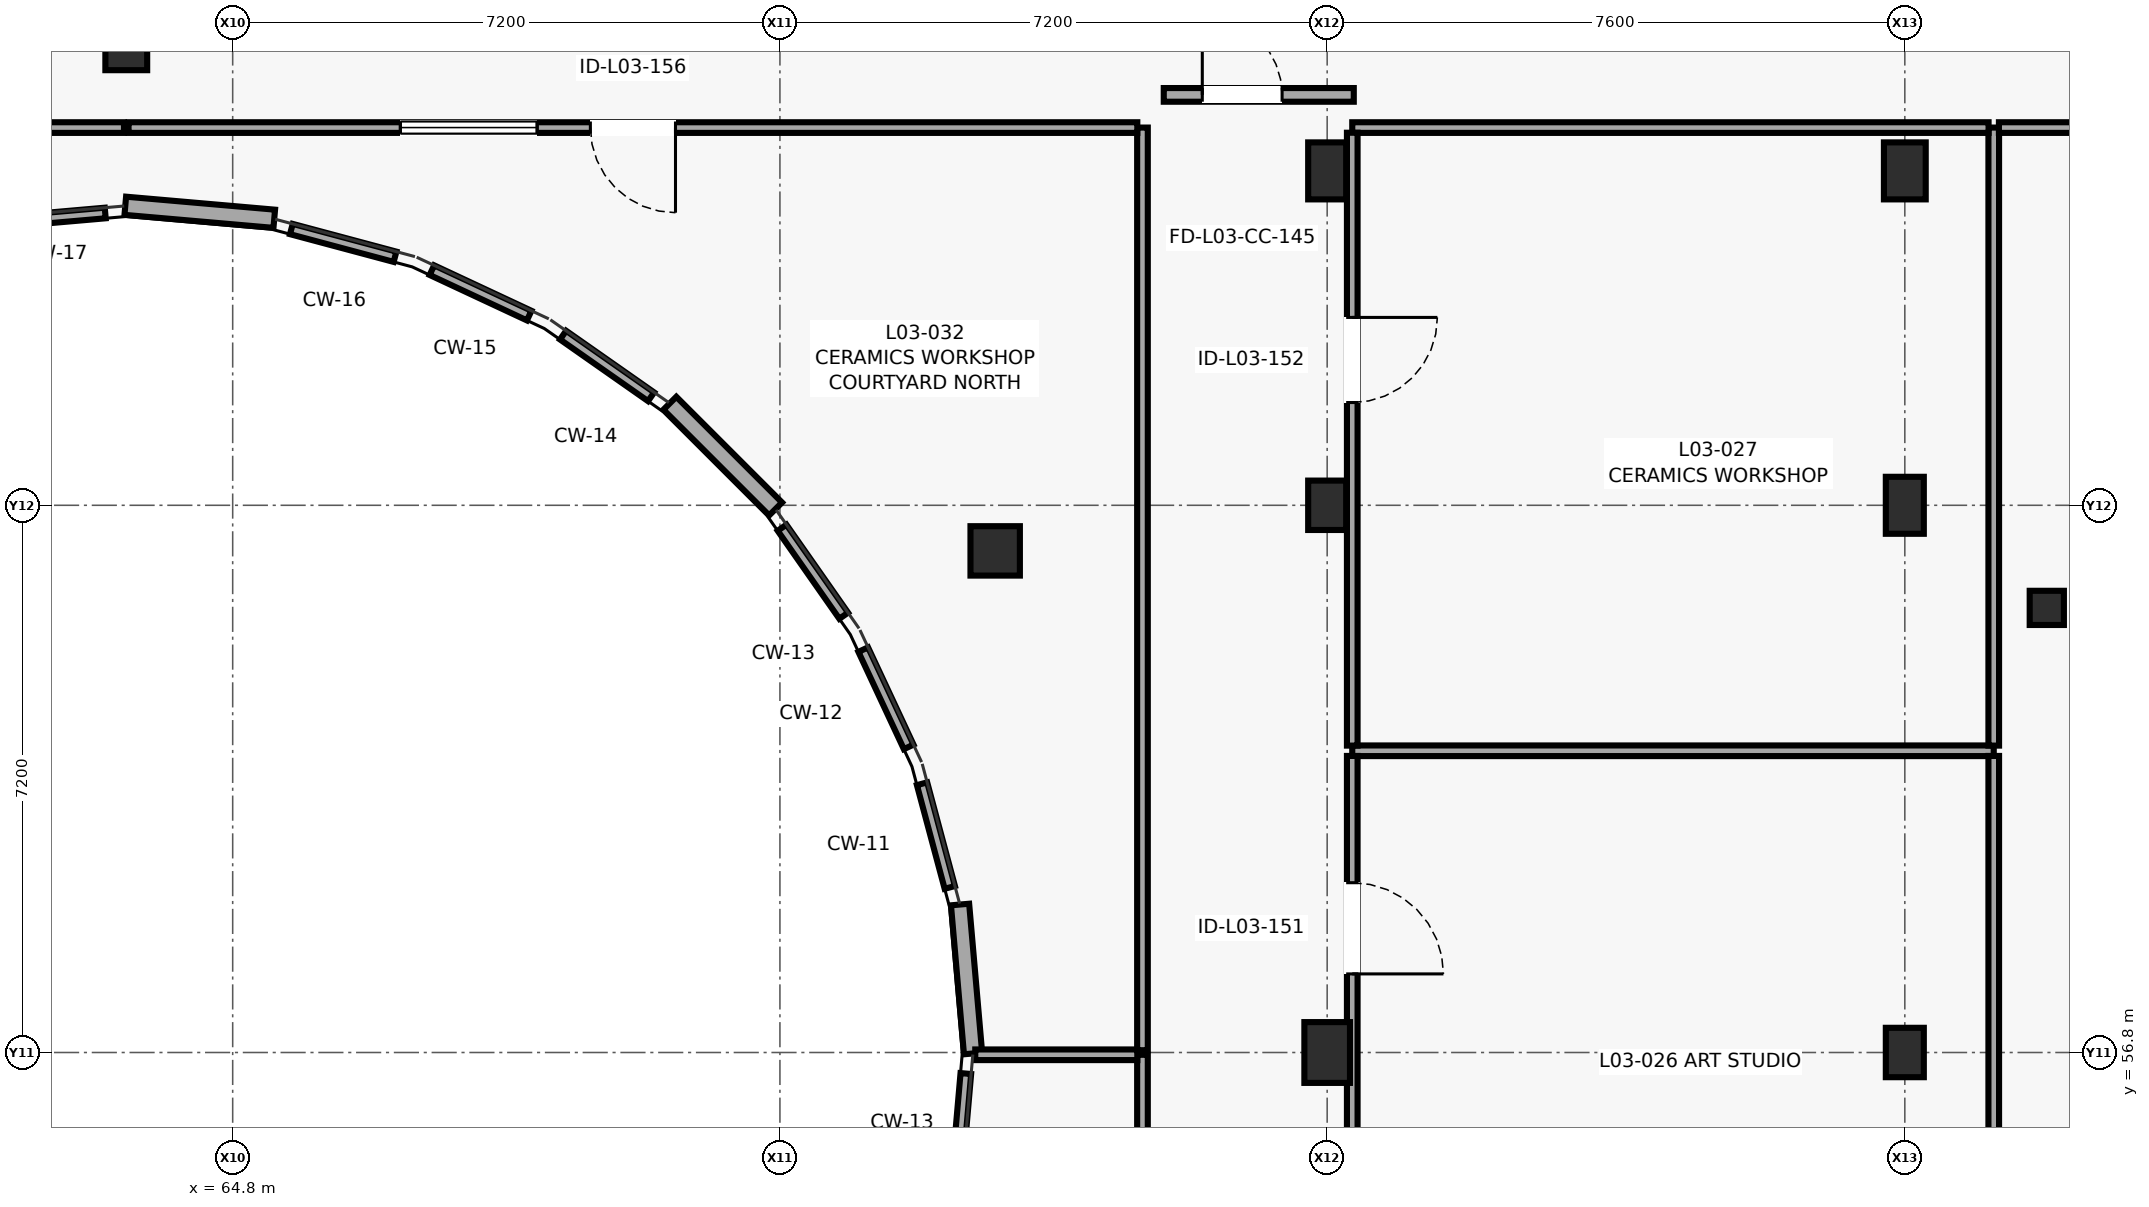
"""IFC4 building model, lengths in metres.
Left out: names, types, materials, properties, quantities, classifications, styles, units other than length and angle.
Written with IfcOpenShell. Run it as: python <this file> out.ifc"""

import sys

from ifc_helpers import new_model, si_unit, direction, frame, frame_2d, origin, origin_2d, place, context, subcontext, project, spatial, rectangle, circle, extrude, element, fill, save


model = new_model("IFC4")
c1 = context("Model", 3, precision=1e-05, world=origin(), true_north=direction((0.0, 1.0)))
c2 = subcontext(c1, "Body", "Model", "MODEL_VIEW")
j1 = project(units=[si_unit("LENGTHUNIT", "METRE"), si_unit("PLANEANGLEUNIT", "RADIAN")], contexts=[c1])
p1 = place(None, origin())
s1 = spatial("IfcSite", under=j1, at=p1, CompositionType="ELEMENT")
p2 = place(p1, origin())
s2 = spatial("IfcBuilding", under=s1, at=p2, CompositionType="ELEMENT")
p3 = place(p2, frame((0.0, 0.0, 12.2)))
s3 = spatial("IfcBuildingStorey", under=s2, at=p3, CompositionType="ELEMENT", Elevation=12.2)
p4 = place(p3, frame((63.4, 70.0, 0.0), z_axis=(0.0, 0.0, 1.0), x_axis=(1.0, 0.0, 0.0)))
e1 = element("IfcColumn", 1, at=p4, inside=s3, PredefinedType="COLUMN", context=c2, shape_type="SweptSolid", body=[
    extrude(circle(Radius=0.275, at=origin_2d()), origin(), (0.0, 0.0, 1.0), 4.0),
])
p5 = place(p3, frame((74.832, 63.4, 0.0), z_axis=(0.0, 0.0, 1.0), x_axis=(1.0, 0.0, 0.0)))
e2 = element("IfcColumn", 2, at=p5, inside=s3, PredefinedType="COLUMN", context=c2, shape_type="SweptSolid", body=[
    extrude(circle(Radius=0.325, at=origin_2d()), origin(), (0.0, 0.0, 1.0), 4.0),
])
p6 = place(p3, frame((79.2, 56.8, 0.0), z_axis=(0.0, 0.0, 1.0), x_axis=(1.0, 0.0, 0.0)))
e3 = element("IfcColumn", 3, at=p6, inside=s3, PredefinedType="COLUMN", context=c2, shape_type="SweptSolid", body=[
    extrude(rectangle(XDim=0.6, YDim=0.8, at=origin_2d()), origin(), (0.0, 0.0, 1.0), 4.0),
])
p7 = place(p3, frame((79.2, 64.0, 0.0), z_axis=(0.0, 0.0, 1.0), x_axis=(1.0, 0.0, 0.0)))
e4 = element("IfcColumn", 4, at=p7, inside=s3, PredefinedType="COLUMN", context=c2, shape_type="SweptSolid", body=[
    extrude(rectangle(XDim=0.5, YDim=0.65, at=origin_2d()), origin(), (0.0, 0.0, 1.0), 4.0),
])
p8 = place(p3, frame((79.2, 68.4, 0.0), z_axis=(0.0, 0.0, 1.0), x_axis=(1.0, 0.0, 0.0)))
e5 = element("IfcColumn", 5, at=p8, inside=s3, PredefinedType="COLUMN", context=c2, shape_type="SweptSolid", body=[
    extrude(rectangle(XDim=0.5, YDim=0.75, at=origin_2d()), origin(), (0.0, 0.0, 1.0), 4.0),
])
p9 = place(p3, frame((86.8, 56.8, 0.0), z_axis=(0.0, 0.0, 1.0), x_axis=(1.0, 0.0, 0.0)))
e6 = element("IfcColumn", 6, at=p9, inside=s3, PredefinedType="COLUMN", context=c2, shape_type="SweptSolid", body=[
    extrude(rectangle(XDim=0.5, YDim=0.65, at=origin_2d()), origin(), (0.0, 0.0, 1.0), 4.0),
])
p10 = place(p3, frame((86.8, 64.0, 0.0), z_axis=(0.0, 0.0, 1.0), x_axis=(1.0, 0.0, 0.0)))
e7 = element("IfcColumn", 7, at=p10, inside=s3, PredefinedType="COLUMN", context=c2, shape_type="SweptSolid", body=[
    extrude(rectangle(XDim=0.5, YDim=0.75, at=origin_2d()), origin(), (0.0, 0.0, 1.0), 4.0),
])
p11 = place(p3, frame((86.8, 68.4, 0.0), z_axis=(0.0, 0.0, 1.0), x_axis=(1.0, 0.0, 0.0)))
e8 = element("IfcColumn", 8, at=p11, inside=s3, PredefinedType="COLUMN", context=c2, shape_type="SweptSolid", body=[
    extrude(rectangle(XDim=0.55, YDim=0.75, at=origin_2d()), origin(), (0.0, 0.0, 1.0), 4.0),
])
p12 = place(p3, frame((88.668, 62.65, 0.0), z_axis=(0.0, 0.0, 1.0), x_axis=(1.0, 0.0, 0.0)))
e9 = element("IfcColumn", 9, at=p12, inside=s3, PredefinedType="COLUMN", context=c2, shape_type="SweptSolid", body=[
    extrude(circle(Radius=0.225, at=origin_2d()), origin(), (0.0, 0.0, 1.0), 4.0),
])
for number, where, z_axis, x_axis in (
    (10, (71.943, 63.952, 0.0), (0.0, 0.0, 1.0), (-0.707, 0.707, 0.0)),
    (11, (65.347, 67.77, 0.0), (0.0, 0.0, 1.0), (-0.996, 0.087, 0.0)),
    (12, (74.541, 56.787, 0.0), (0.0, 0.0, 1.0), (-0.087, 0.996, 0.0)),
):
    element("IfcWall", number, at=place(p3, frame(where, z_axis=z_axis, x_axis=x_axis)), inside=s3, PredefinedType="SOLIDWALL", context=c2, shape_type="SweptSolid", body=[
        extrude(rectangle(XDim=1.967, YDim=0.24, at=frame_2d((0.984, 0.0))), origin(), (0.0, 0.0, 1.0), 3.78),
    ])
p13 = place(p3, frame((77.05, 69.4, 0.0), z_axis=(0.0, 0.0, 1.0), x_axis=(1.0, 0.0, 0.0)))
e13 = element("IfcWall", 13, at=p13, inside=s3, PredefinedType="PARTITIONING", context=c2, shape_type="SweptSolid", body=[
    extrude(rectangle(XDim=2.5, YDim=0.18, at=frame_2d((1.25, 0.0))), origin(), (0.0, 0.0, 1.0), 3.78),
])
p14 = place(p13, frame((0.507, 0.0, 0.0)))
e14 = element("IfcOpeningElement", 14, at=p14, cuts=e13, PredefinedType="OPENING", context=c2, shape_type="SweptSolid", body=[
    extrude(rectangle(XDim=1.05, YDim=2.15, at=frame_2d((0.525, 1.075))), frame((0.0, 0.1, 0.0), z_axis=(0.0, -1.0, 0.0), x_axis=(1.0, 0.0, 0.0)), (0.0, 0.0, 1.0), 0.2),
])
p15 = place(p3, frame((87.97, 60.77, 0.0), z_axis=(0.0, 0.0, 1.0), x_axis=(-1.0, 0.0, 0.0)))
e15 = element("IfcWall", 15, at=p15, inside=s3, PredefinedType="PARTITIONING", context=c2, shape_type="SweptSolid", body=[
    extrude(rectangle(XDim=8.44, YDim=0.14, at=frame_2d((4.22, 0.0))), origin(), (0.0, 0.0, 1.0), 3.755),
])
p16 = place(p3, frame((79.53, 60.702, 0.0), z_axis=(0.0, 0.0, 1.0), x_axis=(0.0, -1.0, 0.0)))
e16 = element("IfcWall", 16, at=p16, inside=s3, PredefinedType="PARTITIONING", context=c2, shape_type="SweptSolid", body=[
    extrude(rectangle(XDim=7.872, YDim=0.14, at=frame_2d((3.936, 0.0))), origin(), (0.0, 0.0, 1.0), 3.755),
])
p17 = place(p16, frame((1.668, 0.0, 0.0)))
e17 = element("IfcOpeningElement", 17, at=p17, cuts=e16, PredefinedType="OPENING", context=c2, shape_type="SweptSolid", body=[
    extrude(rectangle(XDim=1.2, YDim=2.15, at=frame_2d((0.6, 1.075))), frame((0.0, 0.08, 0.0), z_axis=(0.0, -1.0, 0.0), x_axis=(1.0, 0.0, 0.0)), (0.0, 0.0, 1.0), 0.16),
])
p18 = place(p3, frame((87.97, 52.83, 0.0), z_axis=(0.0, 0.0, 1.0), x_axis=(0.0, 1.0, 0.0)))
e18 = element("IfcWall", 18, at=p18, inside=s3, PredefinedType="PARTITIONING", context=c2, shape_type="SweptSolid", body=[
    extrude(rectangle(XDim=7.872, YDim=0.14, at=frame_2d((3.936, 0.0))), origin(), (0.0, 0.0, 1.0), 3.755),
])
p19 = place(p3, frame((87.97, 60.838, 0.0), z_axis=(0.0, 0.0, 1.0), x_axis=(0.0, 1.0, 0.0)))
e19 = element("IfcWall", 19, at=p19, inside=s3, PredefinedType="PARTITIONING", context=c2, shape_type="SweptSolid", body=[
    extrude(rectangle(XDim=8.132, YDim=0.14, at=frame_2d((4.066, 0.0))), origin(), (0.0, 0.0, 1.0), 3.755),
])
p20 = place(p3, frame((87.902, 68.97, 0.0), z_axis=(0.0, 0.0, 1.0), x_axis=(-1.0, 0.0, 0.0)))
e20 = element("IfcWall", 20, at=p20, inside=s3, PredefinedType="PARTITIONING", context=c2, shape_type="SweptSolid", body=[
    extrude(rectangle(XDim=8.372, YDim=0.14, at=frame_2d((4.186, 0.0))), origin(), (0.0, 0.0, 1.0), 3.755),
])
p21 = place(p3, frame((79.53, 68.902, 0.0), z_axis=(0.0, 0.0, 1.0), x_axis=(0.0, -1.0, 0.0)))
e21 = element("IfcWall", 21, at=p21, inside=s3, PredefinedType="PARTITIONING", context=c2, shape_type="SweptSolid", body=[
    extrude(rectangle(XDim=8.064, YDim=0.14, at=frame_2d((4.032, 0.0))), origin(), (0.0, 0.0, 1.0), 3.755),
])
p22 = place(p21, frame((2.43, 0.0, 0.0)))
e22 = element("IfcOpeningElement", 22, at=p22, cuts=e21, PredefinedType="OPENING", context=c2, shape_type="SweptSolid", body=[
    extrude(rectangle(XDim=1.12, YDim=2.18, at=frame_2d((0.56, 1.09))), frame((0.0, 0.08, 0.0), z_axis=(0.0, -1.0, 0.0), x_axis=(1.0, 0.0, 0.0)), (0.0, 0.0, 1.0), 0.16),
])
p23 = place(p3, frame((61.735, 67.725, 0.0), z_axis=(0.0, 0.0, 1.0), x_axis=(0.99623071841, 0.086743044083, 0.0)))
e23 = element("IfcWall", 23, at=p23, inside=s3, PredefinedType="PARTITIONING", context=c2, shape_type="SweptSolid", body=[
    extrude(rectangle(XDim=1.393, YDim=0.14, at=frame_2d((0.697, 0.0))), origin(), (0.0, 0.0, 1.0), 3.755),
])
p24 = place(p3, frame((63.37, 68.97, 0.0), z_axis=(0.0, 0.0, 1.0), x_axis=(-1.0, 0.0, 0.0)))
e24 = element("IfcWall", 24, at=p24, inside=s3, PredefinedType="PARTITIONING", context=c2, shape_type="SweptSolid", body=[
    extrude(rectangle(XDim=17.54, YDim=0.14, at=frame_2d((8.77, 0.0))), origin(), (0.0, 0.0, 1.0), 3.755),
])
p25 = place(p24, frame((8.28, 0.0, 0.0)))
e25 = element("IfcOpeningElement", 25, at=p25, cuts=e24, PredefinedType="OPENING", context=c2, shape_type="SweptSolid", body=[
    extrude(rectangle(XDim=0.98, YDim=2.12, at=frame_2d((0.49, 1.06))), frame((0.0, 0.08, 0.0), z_axis=(0.0, -1.0, 0.0), x_axis=(1.0, 0.0, 0.0)), (0.0, 0.0, 1.0), 0.16),
])
p26 = place(p24, frame((9.96, 0.0, 1.05)))
e26 = element("IfcOpeningElement", 26, at=p26, cuts=e24, PredefinedType="OPENING", context=c2, shape_type="SweptSolid", body=[
    extrude(rectangle(XDim=1.4, YDim=1.05, at=frame_2d((0.7, 0.525))), frame((0.0, 0.08, 0.0), z_axis=(0.0, -1.0, 0.0), x_axis=(1.0, 0.0, 0.0)), (0.0, 0.0, 1.0), 0.16),
])
p27 = place(p3, frame((76.77, 44.698, 0.0), z_axis=(0.0, 0.0, 1.0), x_axis=(0.0, 1.0, 0.0)))
e27 = element("IfcWall", 27, at=p27, inside=s3, PredefinedType="PARTITIONING", context=c2, shape_type="SweptSolid", body=[
    extrude(rectangle(XDim=12.072, YDim=0.14, at=frame_2d((6.036, 0.0))), origin(), (0.0, 0.0, 1.0), 3.755),
])
p28 = place(p27, frame((5.436, 0.0, 0.0)))
e28 = element("IfcOpeningElement", 28, at=p28, cuts=e27, PredefinedType="OPENING", context=c2, shape_type="SweptSolid", body=[
    extrude(rectangle(XDim=1.2, YDim=2.15, at=frame_2d((0.6, 1.075))), frame((0.0, 0.08, 0.0), z_axis=(0.0, -1.0, 0.0), x_axis=(1.0, 0.0, 0.0)), (0.0, 0.0, 1.0), 0.16),
])
p29 = place(p27, frame((7.336, 0.0, 1.05)))
e29 = element("IfcOpeningElement", 29, at=p29, cuts=e27, PredefinedType="OPENING", context=c2, shape_type="SweptSolid", body=[
    extrude(rectangle(XDim=1.6, YDim=1.1, at=frame_2d((0.8, 0.55))), frame((0.0, 0.08, 0.0), z_axis=(0.0, -1.0, 0.0), x_axis=(1.0, 0.0, 0.0)), (0.0, 0.0, 1.0), 0.16),
])
p30 = place(p3, frame((76.702, 56.77, 0.0), z_axis=(0.0, 0.0, 1.0), x_axis=(-1.0, 0.0, 0.0)))
e30 = element("IfcWall", 30, at=p30, inside=s3, PredefinedType="PARTITIONING", context=c2, shape_type="SweptSolid", body=[
    extrude(rectangle(XDim=2.132, YDim=0.14, at=frame_2d((1.066, 0.0))), origin(), (0.0, 0.0, 1.0), 3.755),
])
p31 = place(p3, frame((74.446, 56.523, 0.0), z_axis=(0.0, 0.0, 1.0), x_axis=(-0.086916960031, -0.996215560037, 0.0)))
e31 = element("IfcWall", 31, at=p31, inside=s3, PredefinedType="PARTITIONING", context=c2, shape_type="SweptSolid", body=[
    extrude(rectangle(XDim=1.393, YDim=0.14, at=frame_2d((0.697, 0.0))), origin(), (0.0, 0.0, 1.0), 3.755),
])
p32 = place(p3, frame((73.87, 60.336, 0.0), z_axis=(0.0, 0.0, 1.0), x_axis=(0.258491202719, -0.966013611766, 0.0)))
e32 = element("IfcWall", 32, at=p32, inside=s3, PredefinedType="PARTITIONING", context=c2, shape_type="SweptSolid", body=[
    extrude(rectangle(XDim=1.412, YDim=0.14, at=frame_2d((0.706, 0.0))), origin(), (0.0, 0.0, 1.0), 3.755),
])
p33 = place(p3, frame((76.77, 56.83, 0.0), z_axis=(0.0, 0.0, 1.0), x_axis=(0.0, 1.0, 0.0)))
e33 = element("IfcWall", 33, at=p33, inside=s3, PredefinedType="PARTITIONING", context=c2, shape_type="SweptSolid", body=[
    extrude(rectangle(XDim=12.14, YDim=0.14, at=frame_2d((6.07, 0.0))), origin(), (0.0, 0.0, 1.0), 3.755),
])
p34 = place(p3, frame((76.702, 68.97, 0.0), z_axis=(0.0, 0.0, 1.0), x_axis=(-1.0, 0.0, 0.0)))
e34 = element("IfcWall", 34, at=p34, inside=s3, PredefinedType="PARTITIONING", context=c2, shape_type="SweptSolid", body=[
    extrude(rectangle(XDim=13.272, YDim=0.14, at=frame_2d((6.636, 0.0))), origin(), (0.0, 0.0, 1.0), 3.755),
])
p35 = place(p34, frame((6.076, 0.0, 0.0)))
e35 = element("IfcOpeningElement", 35, at=p35, cuts=e34, PredefinedType="OPENING", context=c2, shape_type="SweptSolid", body=[
    extrude(rectangle(XDim=1.12, YDim=2.18, at=frame_2d((0.56, 1.09))), frame((0.0, 0.08, 0.0), z_axis=(0.0, -1.0, 0.0), x_axis=(1.0, 0.0, 0.0)), (0.0, 0.0, 1.0), 0.16),
])
p36 = place(p34, frame((7.896, 0.0, 1.05)))
e36 = element("IfcOpeningElement", 36, at=p36, cuts=e34, PredefinedType="OPENING", context=c2, shape_type="SweptSolid", body=[
    extrude(rectangle(XDim=1.8, YDim=1.2, at=frame_2d((0.9, 0.6))), frame((0.0, 0.08, 0.0), z_axis=(0.0, -1.0, 0.0), x_axis=(1.0, 0.0, 0.0)), (0.0, 0.0, 1.0), 0.16),
])
p37 = place(p3, frame((65.572, 67.635, 0.0), z_axis=(0.0, 0.0, 1.0), x_axis=(0.966013611766, -0.258491202719, 0.0)))
e37 = element("IfcWall", 37, at=p37, inside=s3, PredefinedType="PARTITIONING", context=c2, shape_type="SweptSolid", body=[
    extrude(rectangle(XDim=1.412, YDim=0.14, at=frame_2d((0.706, 0.0))), origin(), (0.0, 0.0, 1.0), 3.755),
])
p38 = place(p3, frame((67.421, 67.094, 0.0), z_axis=(0.0, 0.0, 1.0), x_axis=(0.906032979506, -0.423207088844, 0.0)))
e38 = element("IfcWall", 38, at=p38, inside=s3, PredefinedType="PARTITIONING", context=c2, shape_type="SweptSolid", body=[
    extrude(rectangle(XDim=1.413, YDim=0.14, at=frame_2d((0.707, 0.0))), origin(), (0.0, 0.0, 1.0), 3.755),
])
for number, where, z_axis, x_axis in (
    (39, (69.147, 66.239, 0.0), (0.0, 0.0, 1.0), (0.819, -0.574, 0.0)),
    (40, (72.028, 63.705, 0.0), (0.0, 0.0, 1.0), (0.574, -0.819, 0.0)),
):
    element("IfcWall", number, at=place(p3, frame(where, z_axis=z_axis, x_axis=x_axis)), inside=s3, PredefinedType="PARTITIONING", context=c2, shape_type="SweptSolid", body=[
        extrude(rectangle(XDim=1.414, YDim=0.14, at=frame_2d((0.707, 0.0))), origin(), (0.0, 0.0, 1.0), 3.755),
    ])
p39 = place(p3, frame((73.096, 62.101, 0.0), z_axis=(0.0, 0.0, 1.0), x_axis=(0.423348930736, -0.905966711775, 0.0)))
e41 = element("IfcWall", 41, at=p39, inside=s3, PredefinedType="PARTITIONING", context=c2, shape_type="SweptSolid", body=[
    extrude(rectangle(XDim=1.413, YDim=0.14, at=frame_2d((0.707, 0.0))), origin(), (0.0, 0.0, 1.0), 3.755),
])
p40 = place(p3, frame((98.77, 68.97, 0.0), z_axis=(0.0, 0.0, 1.0), x_axis=(-1.0, 0.0, 0.0)))
e42 = element("IfcWall", 42, at=p40, inside=s3, PredefinedType="PARTITIONING", context=c2, shape_type="SweptSolid", body=[
    extrude(rectangle(XDim=10.732, YDim=0.14, at=frame_2d((5.366, 0.0))), origin(), (0.0, 0.0, 1.0), 3.755),
])
p41 = place(p40, frame((4.766, 0.0, 0.0)))
e43 = element("IfcOpeningElement", 43, at=p41, cuts=e42, PredefinedType="OPENING", context=c2, shape_type="SweptSolid", body=[
    extrude(rectangle(XDim=1.2, YDim=2.15, at=frame_2d((0.6, 1.075))), frame((0.0, 0.08, 0.0), z_axis=(0.0, -1.0, 0.0), x_axis=(1.0, 0.0, 0.0)), (0.0, 0.0, 1.0), 0.16),
])
p42 = place(p40, frame((6.666, 0.0, 1.05)))
e44 = element("IfcOpeningElement", 44, at=p42, cuts=e42, PredefinedType="OPENING", context=c2, shape_type="SweptSolid", body=[
    extrude(rectangle(XDim=1.4, YDim=1.05, at=frame_2d((0.7, 0.525))), frame((0.0, 0.08, 0.0), z_axis=(0.0, -1.0, 0.0), x_axis=(1.0, 0.0, 0.0)), (0.0, 0.0, 1.0), 0.16),
])
p43 = place(p14, origin())
e45 = element("IfcDoor", 45, at=p43, inside=s3, OperationType="SINGLE_SWING_LEFT", PredefinedType="DOOR", context=c2, shape_type="SweptSolid", body=[
    extrude(rectangle(XDim=1.05, YDim=2.15, at=frame_2d((0.525, 1.075))), frame((0.0, 0.025, 0.0), z_axis=(0.0, -1.0, 0.0), x_axis=(1.0, 0.0, 0.0)), (0.0, 0.0, 1.0), 0.05),
])
fill(e14, e45)
p44 = place(p17, origin())
e46 = element("IfcDoor", 46, at=p44, inside=s3, OperationType="SINGLE_SWING_RIGHT", PredefinedType="DOOR", context=c2, shape_type="SweptSolid", body=[
    extrude(rectangle(XDim=1.2, YDim=2.15, at=frame_2d((0.6, 1.075))), frame((0.0, 0.025, 0.0), z_axis=(0.0, -1.0, 0.0), x_axis=(1.0, 0.0, 0.0)), (0.0, 0.0, 1.0), 0.05),
])
fill(e17, e46)
p45 = place(p22, origin())
e47 = element("IfcDoor", 47, at=p45, inside=s3, OperationType="SINGLE_SWING_LEFT", PredefinedType="DOOR", context=c2, shape_type="SweptSolid", body=[
    extrude(rectangle(XDim=1.12, YDim=2.18, at=frame_2d((0.56, 1.09))), frame((0.0, 0.025, 0.0), z_axis=(0.0, -1.0, 0.0), x_axis=(1.0, 0.0, 0.0)), (0.0, 0.0, 1.0), 0.05),
])
fill(e22, e47)
p46 = place(p35, origin())
e48 = element("IfcDoor", 48, at=p46, inside=s3, OperationType="SINGLE_SWING_LEFT", PredefinedType="DOOR", context=c2, shape_type="SweptSolid", body=[
    extrude(rectangle(XDim=1.12, YDim=2.18, at=frame_2d((0.56, 1.09))), frame((0.0, 0.025, 0.0), z_axis=(0.0, -1.0, 0.0), x_axis=(1.0, 0.0, 0.0)), (0.0, 0.0, 1.0), 0.05),
])
fill(e35, e48)
p47 = place(p36, origin())
e49 = element("IfcWindow", 49, at=p47, inside=s3, PartitioningType="SINGLE_PANEL", PredefinedType="WINDOW", context=c2, shape_type="SweptSolid", body=[
    extrude(rectangle(XDim=1.8, YDim=1.2, at=frame_2d((0.9, 0.6))), frame((0.0, 0.03, 0.0), z_axis=(0.0, -1.0, 0.0), x_axis=(1.0, 0.0, 0.0)), (0.0, 0.0, 1.0), 0.06),
])
fill(e36, e49)
save(model, sys.argv[1])
